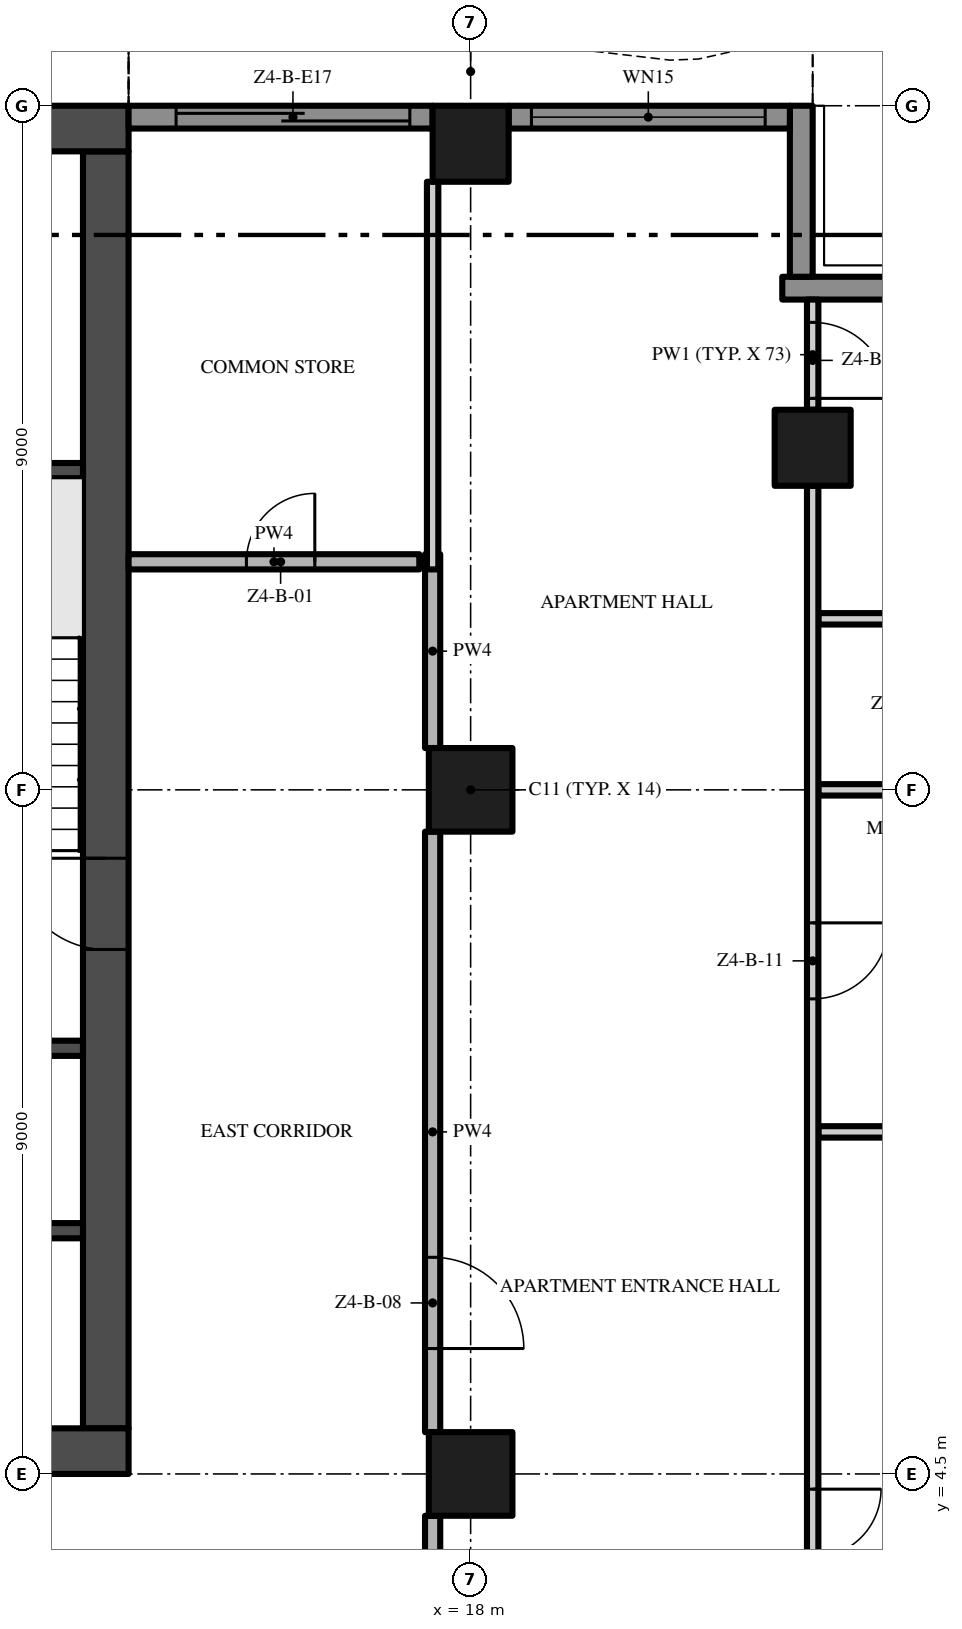
"""IFC4 building model, lengths in metres.
Left out: names, types, materials, properties, quantities, classifications, styles, units other than length and angle.
Written with IfcOpenShell. Run it as: python <this file> out.ifc"""

import sys

from ifc_helpers import new_model, si_unit, direction, frame, frame_2d, origin, origin_2d, place, context, subcontext, project, spatial, polyline, rectangle, outline, extrude, element, fill, save


model = new_model("IFC4")
c1 = context("Model", 3, precision=1e-05, world=origin(), true_north=direction((0.0, 1.0)))
c2 = subcontext(c1, "Body", "Model", "MODEL_VIEW")
j1 = project(units=[si_unit("LENGTHUNIT", "METRE"), si_unit("PLANEANGLEUNIT", "RADIAN")], contexts=[c1])
p1 = place(None, origin())
s1 = spatial("IfcSite", under=j1, at=p1, CompositionType="ELEMENT")
p2 = place(p1, origin())
s2 = spatial("IfcBuilding", under=s1, at=p2, CompositionType="ELEMENT")
p3 = place(p2, frame((0.0, 0.0, 199.6)))
s3 = spatial("IfcBuildingStorey", under=s2, at=p3, CompositionType="ELEMENT", Elevation=199.6)
p4 = place(p3, frame((-13.5, 4.8, -0.3), z_axis=(0.0, 0.0, 1.0), x_axis=(1.0, 0.0, 0.0)))
e1 = element("IfcWall", 1, at=p4, inside=s3, PredefinedType="SHEAR", context=c2, shape_type="SweptSolid", body=[
    extrude(rectangle(XDim=27.0, YDim=0.6, at=frame_2d((13.5, 0.0))), origin(), (0.0, 0.0, 1.0), 3.8),
])
p5 = place(p4, frame((12.0, 0.0, 0.3)))
e2 = element("IfcOpeningElement", 2, at=p5, cuts=e1, PredefinedType="OPENING", context=c2, shape_type="SweptSolid", body=[
    extrude(rectangle(XDim=3.0, YDim=2.4, at=frame_2d((1.5, 1.2))), frame((0.0, 0.31, 0.0), z_axis=(0.0, -1.0, 0.0), x_axis=(1.0, 0.0, 0.0)), (0.0, 0.0, 1.0), 0.62),
])
p6 = place(p4, frame((4.9, 0.0, 0.3)))
e3 = element("IfcOpeningElement", 3, at=p6, cuts=e1, PredefinedType="OPENING", context=c2, shape_type="SweptSolid", body=[
    extrude(rectangle(XDim=1.2, YDim=2.2, at=frame_2d((0.6, 1.1))), frame((0.0, 0.31, 0.0), z_axis=(0.0, -1.0, 0.0), x_axis=(1.0, 0.0, 0.0)), (0.0, 0.0, 1.0), 0.62),
])
p7 = place(p4, frame((20.75, 0.0, 0.3)))
e4 = element("IfcOpeningElement", 4, at=p7, cuts=e1, PredefinedType="OPENING", context=c2, shape_type="SweptSolid", body=[
    extrude(rectangle(XDim=1.5, YDim=2.2, at=frame_2d((0.75, 1.1))), frame((0.0, 0.31, 0.0), z_axis=(0.0, -1.0, 0.0), x_axis=(1.0, 0.0, 0.0)), (0.0, 0.0, 1.0), 0.62),
])
p8 = place(p4, frame((17.4, 0.0, 0.3)))
e5 = element("IfcOpeningElement", 5, at=p8, cuts=e1, PredefinedType="OPENING", context=c2, shape_type="SweptSolid", body=[
    extrude(rectangle(XDim=1.2, YDim=2.2, at=frame_2d((0.6, 1.1))), frame((0.0, 0.31, 0.0), z_axis=(0.0, -1.0, 0.0), x_axis=(1.0, 0.0, 0.0)), (0.0, 0.0, 1.0), 0.62),
])
p9 = place(p3, frame((13.2, 5.1, -0.3), z_axis=(0.0, 0.0, 1.0), x_axis=(0.0, 1.0, 0.0)))
e6 = element("IfcWall", 6, at=p9, inside=s3, PredefinedType="SHEAR", context=c2, shape_type="SweptSolid", body=[
    extrude(rectangle(XDim=16.8, YDim=0.6, at=frame_2d((8.4, 0.0))), origin(), (0.0, 0.0, 1.0), 3.8),
])
p10 = place(p9, frame((6.3, 0.0, 0.3)))
e7 = element("IfcOpeningElement", 7, at=p10, cuts=e6, PredefinedType="OPENING", context=c2, shape_type="SweptSolid", body=[
    extrude(rectangle(XDim=1.2, YDim=2.2, at=frame_2d((0.6, 1.1))), frame((0.0, 0.31, 0.0), z_axis=(0.0, -1.0, 0.0), x_axis=(1.0, 0.0, 0.0)), (0.0, 0.0, 1.0), 0.62),
])
p11 = place(p3, frame((13.5, 22.2, -0.3), z_axis=(0.0, 0.0, 1.0), x_axis=(-1.0, 0.0, 0.0)))
e8 = element("IfcWall", 8, at=p11, inside=s3, PredefinedType="SHEAR", context=c2, shape_type="SweptSolid", body=[
    extrude(rectangle(XDim=27.0, YDim=0.6, at=frame_2d((13.5, 0.0))), origin(), (0.0, 0.0, 1.0), 3.8),
])
p12 = place(p3, frame((18.0, 13.5, 0.0), z_axis=(0.0, 0.0, 1.0), x_axis=(1.0, 0.0, 0.0)))
e9 = element("IfcColumn", 9, at=p12, inside=s3, PredefinedType="COLUMN", context=c2, shape_type="SweptSolid", body=[
    extrude(rectangle(XDim=1.1, YDim=1.1, at=origin_2d()), origin(), (0.0, 0.0, 1.0), 3.5),
])
p13 = place(p3, frame((18.0, 22.0, 0.0), z_axis=(0.0, 0.0, 1.0), x_axis=(1.0, 0.0, 0.0)))
e10 = element("IfcColumn", 10, at=p13, inside=s3, PredefinedType="COLUMN", context=c2, shape_type="SweptSolid", body=[
    extrude(rectangle(XDim=1.0, YDim=1.0, at=origin_2d()), origin(), (0.0, 0.0, 1.0), 3.5),
])
p14 = place(p3, frame((18.0, 4.5, 0.0), z_axis=(0.0, 0.0, 1.0), x_axis=(1.0, 0.0, 0.0)))
e11 = element("IfcColumn", 11, at=p14, inside=s3, PredefinedType="COLUMN", context=c2, shape_type="SweptSolid", body=[
    extrude(rectangle(XDim=1.1, YDim=1.1, at=origin_2d()), origin(), (0.0, 0.0, 1.0), 3.5),
])
p15 = place(p3, frame((22.5, 18.0, 0.0), z_axis=(0.0, 0.0, 1.0), x_axis=(1.0, 0.0, 0.0)))
e12 = element("IfcColumn", 12, at=p15, inside=s3, PredefinedType="COLUMN", context=c2, shape_type="SweptSolid", body=[
    extrude(rectangle(XDim=1.0, YDim=1.0, at=origin_2d()), origin(), (0.0, 0.0, 1.0), 3.5),
])
p16 = place(p3, frame((22.1, 20.1, 0.0), z_axis=(0.0, 0.0, 1.0), x_axis=(1.0, 0.0, 0.0)))
e13 = element("IfcWall", 13, at=p16, inside=s3, PredefinedType="SOLIDWALL", context=c2, shape_type="SweptSolid", body=[
    extrude(rectangle(XDim=2.35, YDim=0.3, at=frame_2d((1.175, 0.0))), origin(), (0.0, 0.0, 1.0), 3.5),
])
p17 = place(p3, frame((22.35, 22.5, 0.0), z_axis=(0.0, 0.0, 1.0), x_axis=(0.0, -1.0, 0.0)))
e14 = element("IfcWall", 14, at=p17, inside=s3, PredefinedType="SOLIDWALL", context=c2, shape_type="SweptSolid", body=[
    extrude(rectangle(XDim=2.25, YDim=0.3, at=frame_2d((1.125, 0.0))), origin(), (0.0, 0.0, 1.0), 3.5),
])
p18 = place(p3, frame((18.5, 22.35, 0.0), z_axis=(0.0, 0.0, 1.0), x_axis=(1.0, 0.0, 0.0)))
e15 = element("IfcWall", 15, at=p18, inside=s3, PredefinedType="SOLIDWALL", context=c2, shape_type="SweptSolid", body=[
    extrude(rectangle(XDim=3.7, YDim=0.3, at=frame_2d((1.85, 0.0))), origin(), (0.0, 0.0, 1.0), 3.5),
])
p19 = place(p18, frame((0.3, 0.0, 0.45)))
e16 = element("IfcOpeningElement", 16, at=p19, cuts=e15, PredefinedType="OPENING", context=c2, shape_type="SweptSolid", body=[
    extrude(rectangle(XDim=3.075, YDim=2.65, at=frame_2d((1.538, 1.325))), frame((0.0, 0.16, 0.0), z_axis=(0.0, -1.0, 0.0), x_axis=(1.0, 0.0, 0.0)), (0.0, 0.0, 1.0), 0.32),
])
p20 = place(p3, frame((13.5, 22.35, 0.0), z_axis=(0.0, 0.0, 1.0), x_axis=(1.0, 0.0, 0.0)))
e17 = element("IfcWall", 17, at=p20, inside=s3, PredefinedType="SOLIDWALL", context=c2, shape_type="SweptSolid", body=[
    extrude(rectangle(XDim=4.0, YDim=0.3, at=frame_2d((2.0, 0.0))), origin(), (0.0, 0.0, 1.0), 3.5),
])
p21 = place(p20, frame((0.625, 0.0, 0.0)))
e18 = element("IfcOpeningElement", 18, at=p21, cuts=e17, PredefinedType="OPENING", context=c2, shape_type="SweptSolid", body=[
    extrude(rectangle(XDim=3.075, YDim=2.4, at=frame_2d((1.538, 1.2))), frame((0.0, 0.16, 0.0), z_axis=(0.0, -1.0, 0.0), x_axis=(1.0, 0.0, 0.0)), (0.0, 0.0, 1.0), 0.32),
])
p22 = place(p3, origin())
e19 = element("IfcWall", 19, at=p22, inside=s3, PredefinedType="USERDEFINED", context=c2, shape_type="SweptSolid", body=[
    extrude(outline(polyline([(22.5, 23.451), (21.0, 23.115), (20.625, 23.1), (19.5, 23.231), (18.0, 23.755), (16.5, 24.488), (15.0, 25.149), (13.5, 25.485), (13.445, 25.241), (14.921, 24.91), (16.395, 24.261), (17.904, 23.524), (19.444, 22.986), (20.615, 22.849), (21.033, 22.866), (22.555, 23.208), (22.5, 23.451)])), origin(), (0.0, 0.0, 1.0), 0.9),
])
for number, where, z_axis, x_axis in (
    (20, (9.65, 7.7, 0.0), (0.0, 0.0, 1.0), (1.0, 0.0, 0.0)),
    (21, (9.65, 10.1, 0.0), (0.0, 0.0, 1.0), (1.0, 0.0, 0.0)),
    (22, (9.65, 17.7, 0.0), (0.0, 0.0, 1.0), (1.0, 0.0, 0.0)),
):
    element("IfcWall", number, at=place(p3, frame(where, z_axis=z_axis, x_axis=x_axis)), inside=s3, PredefinedType="SHEAR", context=c2, shape_type="SweptSolid", body=[
        extrude(rectangle(XDim=3.25, YDim=0.2, at=frame_2d((1.625, 0.0))), origin(), (0.0, 0.0, 1.0), 3.5),
    ])
p23 = place(p3, frame((22.575, 9.0, 0.0), z_axis=(0.0, 0.0, 1.0), x_axis=(1.0, 0.0, 0.0)))
e23 = element("IfcWall", 23, at=p23, inside=s3, PredefinedType="PARTITIONING", context=c2, shape_type="SweptSolid", body=[
    extrude(rectangle(XDim=4.125, YDim=0.15, at=frame_2d((2.062, 0.0))), origin(), (0.0, 0.0, 1.0), 3.5),
])
p24 = place(p3, frame((22.575, 13.5, 0.0), z_axis=(0.0, 0.0, 1.0), x_axis=(1.0, 0.0, 0.0)))
e24 = element("IfcWall", 24, at=p24, inside=s3, PredefinedType="PARTITIONING", context=c2, shape_type="SweptSolid", body=[
    extrude(rectangle(XDim=3.425, YDim=0.15, at=frame_2d((1.712, 0.0))), origin(), (0.0, 0.0, 1.0), 3.5),
])
p25 = place(p3, frame((22.575, 15.75, 0.0), z_axis=(0.0, 0.0, 1.0), x_axis=(1.0, 0.0, 0.0)))
e25 = element("IfcWall", 25, at=p25, inside=s3, PredefinedType="PARTITIONING", context=c2, shape_type="SweptSolid", body=[
    extrude(rectangle(XDim=1.875, YDim=0.15, at=frame_2d((0.938, 0.0))), origin(), (0.0, 0.0, 1.0), 3.5),
])
p26 = place(p3, frame((13.5, 16.5, 0.0), z_axis=(0.0, 0.0, 1.0), x_axis=(1.0, 0.0, 0.0)))
e26 = element("IfcWall", 26, at=p26, inside=s3, PredefinedType="PARTITIONING", context=c2, shape_type="SweptSolid", body=[
    extrude(rectangle(XDim=3.825, YDim=0.2, at=frame_2d((1.913, 0.0))), origin(), (0.0, 0.0, 1.0), 3.5),
])
p27 = place(p26, frame((1.55, 0.0, 0.0)))
e27 = element("IfcOpeningElement", 27, at=p27, cuts=e26, PredefinedType="OPENING", context=c2, shape_type="SweptSolid", body=[
    extrude(rectangle(XDim=0.9, YDim=2.1, at=frame_2d((0.45, 1.05))), frame((0.0, 0.11, 0.0), z_axis=(0.0, -1.0, 0.0), x_axis=(1.0, 0.0, 0.0)), (0.0, 0.0, 1.0), 0.22),
])
p28 = place(p3, frame((17.5, -0.2, 0.0), z_axis=(0.0, 0.0, 1.0), x_axis=(0.0, 1.0, 0.0)))
e28 = element("IfcWall", 28, at=p28, inside=s3, PredefinedType="PARTITIONING", context=c2, shape_type="SweptSolid", body=[
    extrude(rectangle(XDim=4.15, YDim=0.2, at=frame_2d((2.075, 0.0))), origin(), (0.0, 0.0, 1.0), 3.5),
])
p29 = place(p3, frame((17.5, 12.95, 0.0), z_axis=(0.0, 0.0, 1.0), x_axis=(0.0, -1.0, 0.0)))
e29 = element("IfcWall", 29, at=p29, inside=s3, PredefinedType="PARTITIONING", context=c2, shape_type="SweptSolid", body=[
    extrude(rectangle(XDim=7.9, YDim=0.2, at=frame_2d((3.95, 0.0))), origin(), (0.0, 0.0, 1.0), 3.5),
])
p30 = place(p29, frame((5.6, 0.0, 0.0)))
e30 = element("IfcOpeningElement", 30, at=p30, cuts=e29, PredefinedType="OPENING", context=c2, shape_type="SweptSolid", body=[
    extrude(rectangle(XDim=1.2, YDim=2.4, at=frame_2d((0.6, 1.2))), frame((0.0, 0.11, 0.0), z_axis=(0.0, -1.0, 0.0), x_axis=(1.0, 0.0, 0.0)), (0.0, 0.0, 1.0), 0.22),
])
p31 = place(p3, frame((17.5, 14.05, 0.0), z_axis=(0.0, 0.0, 1.0), x_axis=(0.0, 1.0, 0.0)))
e31 = element("IfcWall", 31, at=p31, inside=s3, PredefinedType="PARTITIONING", context=c2, shape_type="SweptSolid", body=[
    extrude(rectangle(XDim=2.55, YDim=0.2, at=frame_2d((1.275, 0.0))), origin(), (0.0, 0.0, 1.0), 3.5),
])
p32 = place(p3, frame((17.5, 16.4, 0.0), z_axis=(0.0, 0.0, 1.0), x_axis=(0.0, 1.0, 0.0)))
e32 = element("IfcWall", 32, at=p32, inside=s3, PredefinedType="PARTITIONING", context=c2, shape_type="SweptSolid", body=[
    extrude(rectangle(XDim=5.1, YDim=0.15, at=frame_2d((2.55, 0.0))), origin(), (0.0, 0.0, 1.0), 3.5),
])
p33 = place(p3, frame((22.5, 17.5, 0.0), z_axis=(0.0, 0.0, 1.0), x_axis=(0.0, -1.0, 0.0)))
e33 = element("IfcWall", 33, at=p33, inside=s3, PredefinedType="PARTITIONING", context=c2, shape_type="SweptSolid", body=[
    extrude(rectangle(XDim=17.4, YDim=0.15, at=frame_2d((8.7, 0.0))), origin(), (0.0, 0.0, 1.0), 3.5),
])
p34 = place(p33, frame((13.2, 0.0, 0.0)))
e34 = element("IfcOpeningElement", 34, at=p34, cuts=e33, PredefinedType="OPENING", context=c2, shape_type="SweptSolid", body=[
    extrude(rectangle(XDim=1.8, YDim=2.4, at=frame_2d((0.9, 1.2))), frame((0.0, 0.085, 0.0), z_axis=(0.0, -1.0, 0.0), x_axis=(1.0, 0.0, 0.0)), (0.0, 0.0, 1.0), 0.17),
])
p35 = place(p33, frame((5.75, 0.0, 0.0)))
e35 = element("IfcOpeningElement", 35, at=p35, cuts=e33, PredefinedType="OPENING", context=c2, shape_type="SweptSolid", body=[
    extrude(rectangle(XDim=1.0, YDim=2.4, at=frame_2d((0.5, 1.2))), frame((0.0, 0.085, 0.0), z_axis=(0.0, -1.0, 0.0), x_axis=(1.0, 0.0, 0.0)), (0.0, 0.0, 1.0), 0.17),
])
p36 = place(p3, frame((22.5, 19.95, 0.0), z_axis=(0.0, 0.0, 1.0), x_axis=(0.0, -1.0, 0.0)))
e36 = element("IfcWall", 36, at=p36, inside=s3, PredefinedType="PARTITIONING", context=c2, shape_type="SweptSolid", body=[
    extrude(rectangle(XDim=1.45, YDim=0.15, at=frame_2d((0.725, 0.0))), origin(), (0.0, 0.0, 1.0), 3.5),
])
p37 = place(p36, frame((0.3, 0.0, 0.0)))
e37 = element("IfcOpeningElement", 37, at=p37, cuts=e36, PredefinedType="OPENING", context=c2, shape_type="SweptSolid", body=[
    extrude(rectangle(XDim=1.0, YDim=2.4, at=frame_2d((0.5, 1.2))), frame((0.0, 0.085, 0.0), z_axis=(0.0, -1.0, 0.0), x_axis=(1.0, 0.0, 0.0)), (0.0, 0.0, 1.0), 0.17),
])
p38 = place(p19, origin())
e38 = element("IfcWindow", 38, at=p38, inside=s3, PartitioningType="SINGLE_PANEL", PredefinedType="WINDOW", context=c2, shape_type="SweptSolid", body=[
    extrude(rectangle(XDim=3.075, YDim=2.65, at=frame_2d((1.538, 1.325))), frame((0.0, 0.03, 0.0), z_axis=(0.0, -1.0, 0.0), x_axis=(1.0, 0.0, 0.0)), (0.0, 0.0, 1.0), 0.06),
])
fill(e16, e38)
p39 = place(p21, origin())
e39 = element("IfcDoor", 39, at=p39, inside=s3, OperationType="SINGLE_SWING_LEFT", PredefinedType="DOOR", context=c2, shape_type="SweptSolid", body=[
    extrude(rectangle(XDim=3.075, YDim=2.4, at=frame_2d((1.538, 1.2))), frame((0.0, 0.025, 0.0), z_axis=(0.0, -1.0, 0.0), x_axis=(1.0, 0.0, 0.0)), (0.0, 0.0, 1.0), 0.05),
])
fill(e18, e39)
p40 = place(p10, frame((1.2, 0.0, 0.0), z_axis=(0.0, 0.0, 1.0), x_axis=(-1.0, 0.0, 0.0)))
e40 = element("IfcDoor", 40, at=p40, inside=s3, OperationType="SINGLE_SWING_LEFT", PredefinedType="DOOR", context=c2, shape_type="SweptSolid", body=[
    extrude(rectangle(XDim=1.2, YDim=2.2, at=frame_2d((0.6, 1.1))), frame((0.0, 0.025, 0.0), z_axis=(0.0, -1.0, 0.0), x_axis=(1.0, 0.0, 0.0)), (0.0, 0.0, 1.0), 0.05),
])
fill(e7, e40)
p41 = place(p27, origin())
e41 = element("IfcDoor", 41, at=p41, inside=s3, OperationType="SINGLE_SWING_RIGHT", PredefinedType="DOOR", context=c2, shape_type="SweptSolid", body=[
    extrude(rectangle(XDim=0.9, YDim=2.1, at=frame_2d((0.45, 1.05))), frame((0.0, 0.025, 0.0), z_axis=(0.0, -1.0, 0.0), x_axis=(1.0, 0.0, 0.0)), (0.0, 0.0, 1.0), 0.05),
])
fill(e27, e41)
p42 = place(p30, origin())
e42 = element("IfcDoor", 42, at=p42, inside=s3, OperationType="SINGLE_SWING_RIGHT", PredefinedType="DOOR", context=c2, shape_type="SweptSolid", body=[
    extrude(rectangle(XDim=1.2, YDim=2.4, at=frame_2d((0.6, 1.2))), frame((0.0, 0.025, 0.0), z_axis=(0.0, -1.0, 0.0), x_axis=(1.0, 0.0, 0.0)), (0.0, 0.0, 1.0), 0.05),
])
fill(e30, e42)
p43 = place(p34, origin())
e43 = element("IfcDoor", 43, at=p43, inside=s3, OperationType="DOUBLE_DOOR_SINGLE_SWING", PredefinedType="DOOR", context=c2, shape_type="SweptSolid", body=[
    extrude(rectangle(XDim=1.8, YDim=2.4, at=frame_2d((0.9, 1.2))), frame((0.0, 0.025, 0.0), z_axis=(0.0, -1.0, 0.0), x_axis=(1.0, 0.0, 0.0)), (0.0, 0.0, 1.0), 0.05),
])
fill(e34, e43)
p44 = place(p35, origin())
e44 = element("IfcDoor", 44, at=p44, inside=s3, OperationType="SINGLE_SWING_LEFT", PredefinedType="DOOR", context=c2, shape_type="SweptSolid", body=[
    extrude(rectangle(XDim=1.0, YDim=2.4, at=frame_2d((0.5, 1.2))), frame((0.0, 0.025, 0.0), z_axis=(0.0, -1.0, 0.0), x_axis=(1.0, 0.0, 0.0)), (0.0, 0.0, 1.0), 0.05),
])
fill(e35, e44)
p45 = place(p37, origin())
e45 = element("IfcDoor", 45, at=p45, inside=s3, OperationType="SINGLE_SWING_RIGHT", PredefinedType="DOOR", context=c2, shape_type="SweptSolid", body=[
    extrude(rectangle(XDim=1.0, YDim=2.4, at=frame_2d((0.5, 1.2))), frame((0.0, 0.025, 0.0), z_axis=(0.0, -1.0, 0.0), x_axis=(1.0, 0.0, 0.0)), (0.0, 0.0, 1.0), 0.05),
])
fill(e37, e45)
save(model, sys.argv[1])
